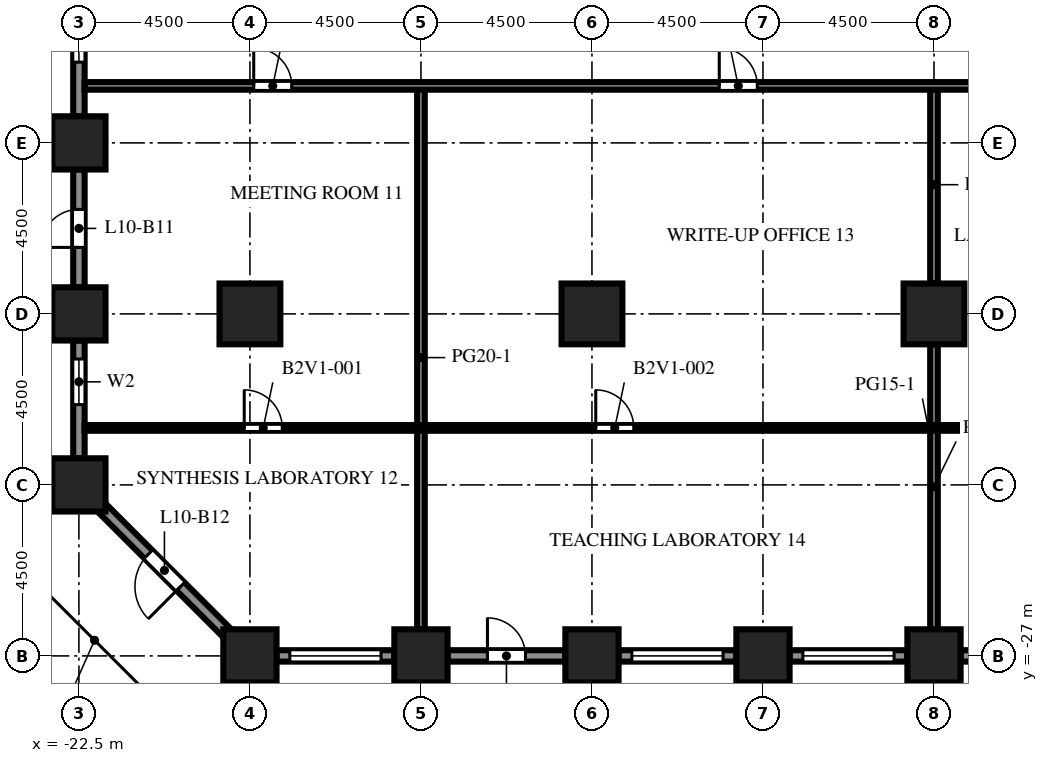
"""IFC4 building model, lengths in metres.
Left out: names, types, materials, properties, quantities, classifications, styles, units other than length and angle.
Written with IfcOpenShell. Run it as: python <this file> out.ifc"""

import sys

from ifc_helpers import new_model, si_unit, direction, frame, frame_2d, origin, origin_2d, place, context, subcontext, project, spatial, rectangle, extrude, element, fill, save


model = new_model("IFC4")
c1 = context("Model", 3, precision=1e-05, world=origin(), true_north=direction((0.0, 1.0)))
c2 = subcontext(c1, "Body", "Model", "MODEL_VIEW")
j1 = project(units=[si_unit("LENGTHUNIT", "METRE"), si_unit("PLANEANGLEUNIT", "RADIAN")], contexts=[c1])
p1 = place(None, origin())
s1 = spatial("IfcSite", under=j1, at=p1, CompositionType="ELEMENT")
p2 = place(p1, origin())
s2 = spatial("IfcBuilding", under=s1, at=p2, CompositionType="ELEMENT")
p3 = place(p2, frame((0.0, 0.0, 46.0)))
s3 = spatial("IfcBuildingStorey", under=s2, at=p3, CompositionType="ELEMENT", Elevation=46.0)
for number, where, z_axis, x_axis in (
    (1, (-22.5, -22.5, 0.0), (0.0, 0.0, 1.0), (1.0, 0.0, 0.0)),
    (2, (-22.5, -18.0, 0.0), (0.0, 0.0, 1.0), (1.0, 0.0, 0.0)),
    (3, (-22.5, -13.5, 0.0), (0.0, 0.0, 1.0), (1.0, 0.0, 0.0)),
    (4, (-18.0, -27.0, 0.0), (0.0, 0.0, 1.0), (1.0, 0.0, 0.0)),
    (5, (-13.5, -27.0, 0.0), (0.0, 0.0, 1.0), (1.0, 0.0, 0.0)),
    (6, (-9.0, -27.0, 0.0), (0.0, 0.0, 1.0), (1.0, 0.0, 0.0)),
    (7, (-4.5, -27.0, 0.0), (0.0, 0.0, 1.0), (1.0, 0.0, 0.0)),
    (8, (0.0, -27.0, 0.0), (0.0, 0.0, 1.0), (1.0, 0.0, 0.0)),
):
    element("IfcColumn", number, at=place(p3, frame(where, z_axis=z_axis, x_axis=x_axis)), inside=s3, PredefinedType="COLUMN", context=c2, shape_type="SweptSolid", body=[
        extrude(rectangle(XDim=1.4, YDim=1.4, at=origin_2d()), origin(), (0.0, 0.0, 1.0), 4.1),
    ])
for number, where, z_axis, x_axis in (
    (9, (-18.0, -18.0, 0.0), (0.0, 0.0, 1.0), (1.0, 0.0, 0.0)),
    (10, (-9.0, -18.0, 0.0), (0.0, 0.0, 1.0), (1.0, 0.0, 0.0)),
    (11, (0.0, -18.0, 0.0), (0.0, 0.0, 1.0), (1.0, 0.0, 0.0)),
):
    element("IfcColumn", number, at=place(p3, frame(where, z_axis=z_axis, x_axis=x_axis)), inside=s3, PredefinedType="COLUMN", context=c2, shape_type="SweptSolid", body=[
        extrude(rectangle(XDim=1.6, YDim=1.6, at=origin_2d()), origin(), (0.0, 0.0, 1.0), 4.1),
    ])
p4 = place(p3, frame((-14.2, -27.0, 0.0), z_axis=(0.0, 0.0, 1.0), x_axis=(-1.0, 0.0, 0.0)))
e12 = element("IfcWall", 12, at=p4, inside=s3, PredefinedType="SOLIDWALL", context=c2, shape_type="SweptSolid", body=[
    extrude(rectangle(XDim=3.1, YDim=0.3, at=frame_2d((1.55, 0.0))), origin(), (0.0, 0.0, 1.0), 2.75),
])
p5 = place(p4, frame((0.35, 0.0, 0.8)))
e13 = element("IfcOpeningElement", 13, at=p5, cuts=e12, PredefinedType="OPENING", context=c2, shape_type="SweptSolid", body=[
    extrude(rectangle(XDim=2.4, YDim=1.7, at=frame_2d((1.2, 0.85))), frame((0.0, 0.16, 0.0), z_axis=(0.0, -1.0, 0.0), x_axis=(1.0, 0.0, 0.0)), (0.0, 0.0, 1.0), 0.32),
])
p6 = place(p3, frame((-9.7, -27.0, 0.0), z_axis=(0.0, 0.0, 1.0), x_axis=(-1.0, 0.0, 0.0)))
e14 = element("IfcWall", 14, at=p6, inside=s3, PredefinedType="SOLIDWALL", context=c2, shape_type="SweptSolid", body=[
    extrude(rectangle(XDim=3.1, YDim=0.3, at=frame_2d((1.55, 0.0))), origin(), (0.0, 0.0, 1.0), 2.75),
])
p7 = place(p6, frame((1.05, 0.0, 0.0)))
e15 = element("IfcOpeningElement", 15, at=p7, cuts=e14, PredefinedType="OPENING", context=c2, shape_type="SweptSolid", body=[
    extrude(rectangle(XDim=1.0, YDim=2.2, at=frame_2d((0.5, 1.1))), frame((0.0, 0.16, 0.0), z_axis=(0.0, -1.0, 0.0), x_axis=(1.0, 0.0, 0.0)), (0.0, 0.0, 1.0), 0.32),
])
p8 = place(p3, frame((-5.2, -27.0, 0.0), z_axis=(0.0, 0.0, 1.0), x_axis=(-1.0, 0.0, 0.0)))
e16 = element("IfcWall", 16, at=p8, inside=s3, PredefinedType="SOLIDWALL", context=c2, shape_type="SweptSolid", body=[
    extrude(rectangle(XDim=3.1, YDim=0.3, at=frame_2d((1.55, 0.0))), origin(), (0.0, 0.0, 1.0), 2.75),
])
p9 = place(p8, frame((0.35, 0.0, 0.8)))
e17 = element("IfcOpeningElement", 17, at=p9, cuts=e16, PredefinedType="OPENING", context=c2, shape_type="SweptSolid", body=[
    extrude(rectangle(XDim=2.4, YDim=1.7, at=frame_2d((1.2, 0.85))), frame((0.0, 0.16, 0.0), z_axis=(0.0, -1.0, 0.0), x_axis=(1.0, 0.0, 0.0)), (0.0, 0.0, 1.0), 0.32),
])
p10 = place(p3, frame((-0.7, -27.0, 0.0), z_axis=(0.0, 0.0, 1.0), x_axis=(-1.0, 0.0, 0.0)))
e18 = element("IfcWall", 18, at=p10, inside=s3, PredefinedType="SOLIDWALL", context=c2, shape_type="SweptSolid", body=[
    extrude(rectangle(XDim=3.1, YDim=0.3, at=frame_2d((1.55, 0.0))), origin(), (0.0, 0.0, 1.0), 2.75),
])
p11 = place(p10, frame((0.35, 0.0, 0.8)))
e19 = element("IfcOpeningElement", 19, at=p11, cuts=e18, PredefinedType="OPENING", context=c2, shape_type="SweptSolid", body=[
    extrude(rectangle(XDim=2.4, YDim=1.7, at=frame_2d((1.2, 0.85))), frame((0.0, 0.16, 0.0), z_axis=(0.0, -1.0, 0.0), x_axis=(1.0, 0.0, 0.0)), (0.0, 0.0, 1.0), 0.32),
])
p12 = place(p3, frame((3.8, -27.0, 0.0), z_axis=(0.0, 0.0, 1.0), x_axis=(-1.0, 0.0, 0.0)))
e20 = element("IfcWall", 20, at=p12, inside=s3, PredefinedType="SOLIDWALL", context=c2, shape_type="SweptSolid", body=[
    extrude(rectangle(XDim=3.1, YDim=0.3, at=frame_2d((1.55, 0.0))), origin(), (0.0, 0.0, 1.0), 2.75),
])
p13 = place(p12, frame((0.35, 0.0, 0.8)))
e21 = element("IfcOpeningElement", 21, at=p13, cuts=e20, PredefinedType="OPENING", context=c2, shape_type="SweptSolid", body=[
    extrude(rectangle(XDim=2.4, YDim=1.7, at=frame_2d((1.2, 0.85))), frame((0.0, 0.16, 0.0), z_axis=(0.0, -1.0, 0.0), x_axis=(1.0, 0.0, 0.0)), (0.0, 0.0, 1.0), 0.32),
])
p14 = place(p3, frame((-22.5, -12.8, 0.0), z_axis=(0.0, 0.0, 1.0), x_axis=(0.0, 1.0, 0.0)))
e22 = element("IfcWall", 22, at=p14, inside=s3, PredefinedType="SOLIDWALL", context=c2, shape_type="SweptSolid", body=[
    extrude(rectangle(XDim=3.1, YDim=0.3, at=frame_2d((1.55, 0.0))), origin(), (0.0, 0.0, 1.0), 2.75),
])
p15 = place(p14, frame((1.425, 0.0, 0.8)))
e23 = element("IfcOpeningElement", 23, at=p15, cuts=e22, PredefinedType="OPENING", context=c2, shape_type="SweptSolid", body=[
    extrude(rectangle(XDim=1.2, YDim=1.7, at=frame_2d((0.6, 0.85))), frame((0.0, 0.16, 0.0), z_axis=(0.0, -1.0, 0.0), x_axis=(1.0, 0.0, 0.0)), (0.0, 0.0, 1.0), 0.32),
])
p16 = place(p3, frame((-22.5, -17.3, 0.0), z_axis=(0.0, 0.0, 1.0), x_axis=(0.0, 1.0, 0.0)))
e24 = element("IfcWall", 24, at=p16, inside=s3, PredefinedType="SOLIDWALL", context=c2, shape_type="SweptSolid", body=[
    extrude(rectangle(XDim=3.1, YDim=0.3, at=frame_2d((1.55, 0.0))), origin(), (0.0, 0.0, 1.0), 2.75),
])
p17 = place(p16, frame((1.05, 0.0, 0.0)))
e25 = element("IfcOpeningElement", 25, at=p17, cuts=e24, PredefinedType="OPENING", context=c2, shape_type="SweptSolid", body=[
    extrude(rectangle(XDim=1.0, YDim=2.2, at=frame_2d((0.5, 1.1))), frame((0.0, 0.16, 0.0), z_axis=(0.0, -1.0, 0.0), x_axis=(1.0, 0.0, 0.0)), (0.0, 0.0, 1.0), 0.32),
])
p18 = place(p3, frame((-22.5, -21.8, 0.0), z_axis=(0.0, 0.0, 1.0), x_axis=(0.0, 1.0, 0.0)))
e26 = element("IfcWall", 26, at=p18, inside=s3, PredefinedType="SOLIDWALL", context=c2, shape_type="SweptSolid", body=[
    extrude(rectangle(XDim=3.1, YDim=0.3, at=frame_2d((1.55, 0.0))), origin(), (0.0, 0.0, 1.0), 2.75),
])
p19 = place(p18, frame((1.413, 0.0, 0.8)))
e27 = element("IfcOpeningElement", 27, at=p19, cuts=e26, PredefinedType="OPENING", context=c2, shape_type="SweptSolid", body=[
    extrude(rectangle(XDim=1.2, YDim=1.7, at=frame_2d((0.6, 0.85))), frame((0.0, 0.16, 0.0), z_axis=(0.0, -1.0, 0.0), x_axis=(1.0, 0.0, 0.0)), (0.0, 0.0, 1.0), 0.32),
])
p20 = place(p3, frame((-18.594, -26.406, 0.0), z_axis=(0.0, 0.0, 1.0), x_axis=(-0.707106781187, 0.707106781187, 0.0)))
e28 = element("IfcWall", 28, at=p20, inside=s3, PredefinedType="SOLIDWALL", context=c2, shape_type="SweptSolid", body=[
    extrude(rectangle(XDim=4.684, YDim=0.3, at=frame_2d((2.342, 0.0))), origin(), (0.0, 0.0, 1.0), 2.75),
])
p21 = place(p20, frame((1.742, 0.0, 0.0)))
e29 = element("IfcOpeningElement", 29, at=p21, cuts=e28, PredefinedType="OPENING", context=c2, shape_type="SweptSolid", body=[
    extrude(rectangle(XDim=1.2, YDim=2.2, at=frame_2d((0.6, 1.1))), frame((0.0, 0.16, 0.0), z_axis=(0.0, -1.0, 0.0), x_axis=(1.0, 0.0, 0.0)), (0.0, 0.0, 1.0), 0.32),
])
p22 = place(p3, frame((-13.5, -26.3, 0.0), z_axis=(0.0, 0.0, 1.0), x_axis=(0.0, 1.0, 0.0)))
e30 = element("IfcWall", 30, at=p22, inside=s3, PredefinedType="PARTITIONING", context=c2, shape_type="SweptSolid", body=[
    extrude(rectangle(XDim=14.3, YDim=0.2, at=frame_2d((7.15, 0.0))), origin(), (0.0, 0.0, 1.0), 3.65),
])
p23 = place(p3, frame((0.0, -26.3, 0.0), z_axis=(0.0, 0.0, 1.0), x_axis=(0.0, 1.0, 0.0)))
e31 = element("IfcWall", 31, at=p23, inside=s3, PredefinedType="PARTITIONING", context=c2, shape_type="SweptSolid", body=[
    extrude(rectangle(XDim=7.5, YDim=0.2, at=frame_2d((3.75, 0.0))), origin(), (0.0, 0.0, 1.0), 3.65),
])
p24 = place(p3, frame((0.0, -17.2, 0.0), z_axis=(0.0, 0.0, 1.0), x_axis=(0.0, 1.0, 0.0)))
e32 = element("IfcWall", 32, at=p24, inside=s3, PredefinedType="PARTITIONING", context=c2, shape_type="SweptSolid", body=[
    extrude(rectangle(XDim=5.2, YDim=0.2, at=frame_2d((2.6, 0.0))), origin(), (0.0, 0.0, 1.0), 3.65),
])
p25 = place(p3, frame((31.35, -21.0, 0.0), z_axis=(0.0, 0.0, 1.0), x_axis=(-1.0, 0.0, 0.0)))
e33 = element("IfcWall", 33, at=p25, inside=s3, PredefinedType="PARTITIONING", context=c2, shape_type="SweptSolid", body=[
    extrude(rectangle(XDim=53.7, YDim=0.15, at=frame_2d((26.85, 0.0))), origin(), (0.0, 0.0, 1.0), 3.65),
])
p26 = place(p25, frame((48.5, 0.0, 0.0)))
e34 = element("IfcOpeningElement", 34, at=p26, cuts=e33, PredefinedType="OPENING", context=c2, shape_type="SweptSolid", body=[
    extrude(rectangle(XDim=1.0, YDim=2.1, at=frame_2d((0.5, 1.05))), frame((0.0, 0.085, 0.0), z_axis=(0.0, -1.0, 0.0), x_axis=(1.0, 0.0, 0.0)), (0.0, 0.0, 1.0), 0.17),
])
p27 = place(p25, frame((39.25, 0.0, 0.0)))
e35 = element("IfcOpeningElement", 35, at=p27, cuts=e33, PredefinedType="OPENING", context=c2, shape_type="SweptSolid", body=[
    extrude(rectangle(XDim=1.0, YDim=2.1, at=frame_2d((0.5, 1.05))), frame((0.0, 0.085, 0.0), z_axis=(0.0, -1.0, 0.0), x_axis=(1.0, 0.0, 0.0)), (0.0, 0.0, 1.0), 0.17),
])
p28 = place(p25, frame((22.75, 0.0, 0.0)))
e36 = element("IfcOpeningElement", 36, at=p28, cuts=e33, PredefinedType="OPENING", context=c2, shape_type="SweptSolid", body=[
    extrude(rectangle(XDim=1.0, YDim=2.1, at=frame_2d((0.5, 1.05))), frame((0.0, 0.085, 0.0), z_axis=(0.0, -1.0, 0.0), x_axis=(1.0, 0.0, 0.0)), (0.0, 0.0, 1.0), 0.17),
])
p29 = place(p25, frame((13.5, 0.0, 0.0)))
e37 = element("IfcOpeningElement", 37, at=p29, cuts=e33, PredefinedType="OPENING", context=c2, shape_type="SweptSolid", body=[
    extrude(rectangle(XDim=1.0, YDim=2.1, at=frame_2d((0.5, 1.05))), frame((0.0, 0.085, 0.0), z_axis=(0.0, -1.0, 0.0), x_axis=(1.0, 0.0, 0.0)), (0.0, 0.0, 1.0), 0.17),
])
p30 = place(p25, frame((3.25, 0.0, 0.0)))
e38 = element("IfcOpeningElement", 38, at=p30, cuts=e33, PredefinedType="OPENING", context=c2, shape_type="SweptSolid", body=[
    extrude(rectangle(XDim=1.0, YDim=2.1, at=frame_2d((0.5, 1.05))), frame((0.0, 0.085, 0.0), z_axis=(0.0, -1.0, 0.0), x_axis=(1.0, 0.0, 0.0)), (0.0, 0.0, 1.0), 0.17),
])
p31 = place(p3, frame((31.35, -12.0, 0.0), z_axis=(0.0, 0.0, 1.0), x_axis=(-1.0, 0.0, 0.0)))
e39 = element("IfcWall", 39, at=p31, inside=s3, PredefinedType="PARTITIONING", context=c2, shape_type="SweptSolid", body=[
    extrude(rectangle(XDim=53.7, YDim=0.2, at=frame_2d((26.85, 0.0))), origin(), (0.0, 0.0, 1.0), 3.65),
])
p32 = place(p31, frame((48.25, 0.0, 0.0)))
e40 = element("IfcOpeningElement", 40, at=p32, cuts=e39, PredefinedType="OPENING", context=c2, shape_type="SweptSolid", body=[
    extrude(rectangle(XDim=1.0, YDim=2.1, at=frame_2d((0.5, 1.05))), frame((0.0, 0.11, 0.0), z_axis=(0.0, -1.0, 0.0), x_axis=(1.0, 0.0, 0.0)), (0.0, 0.0, 1.0), 0.22),
])
p33 = place(p31, frame((36.0, 0.0, 0.0)))
e41 = element("IfcOpeningElement", 41, at=p33, cuts=e39, PredefinedType="OPENING", context=c2, shape_type="SweptSolid", body=[
    extrude(rectangle(XDim=1.0, YDim=2.1, at=frame_2d((0.5, 1.05))), frame((0.0, 0.11, 0.0), z_axis=(0.0, -1.0, 0.0), x_axis=(1.0, 0.0, 0.0)), (0.0, 0.0, 1.0), 0.22),
])
p34 = place(p31, frame((25.75, 0.0, 0.0)))
e42 = element("IfcOpeningElement", 42, at=p34, cuts=e39, PredefinedType="OPENING", context=c2, shape_type="SweptSolid", body=[
    extrude(rectangle(XDim=1.0, YDim=2.1, at=frame_2d((0.5, 1.05))), frame((0.0, 0.11, 0.0), z_axis=(0.0, -1.0, 0.0), x_axis=(1.0, 0.0, 0.0)), (0.0, 0.0, 1.0), 0.22),
])
p35 = place(p31, frame((12.5, 0.0, 0.0)))
e43 = element("IfcOpeningElement", 43, at=p35, cuts=e39, PredefinedType="OPENING", context=c2, shape_type="SweptSolid", body=[
    extrude(rectangle(XDim=1.0, YDim=2.1, at=frame_2d((0.5, 1.05))), frame((0.0, 0.11, 0.0), z_axis=(0.0, -1.0, 0.0), x_axis=(1.0, 0.0, 0.0)), (0.0, 0.0, 1.0), 0.22),
])
p36 = place(p31, frame((3.75, 0.0, 0.0)))
e44 = element("IfcOpeningElement", 44, at=p36, cuts=e39, PredefinedType="OPENING", context=c2, shape_type="SweptSolid", body=[
    extrude(rectangle(XDim=1.0, YDim=2.1, at=frame_2d((0.5, 1.05))), frame((0.0, 0.11, 0.0), z_axis=(0.0, -1.0, 0.0), x_axis=(1.0, 0.0, 0.0)), (0.0, 0.0, 1.0), 0.22),
])
p37 = place(p5, origin())
e45 = element("IfcWindow", 45, at=p37, inside=s3, PartitioningType="SINGLE_PANEL", PredefinedType="WINDOW", context=c2, shape_type="SweptSolid", body=[
    extrude(rectangle(XDim=2.4, YDim=1.7, at=frame_2d((1.2, 0.85))), frame((0.0, 0.03, 0.0), z_axis=(0.0, -1.0, 0.0), x_axis=(1.0, 0.0, 0.0)), (0.0, 0.0, 1.0), 0.06),
])
fill(e13, e45)
p38 = place(p7, origin())
e46 = element("IfcDoor", 46, at=p38, inside=s3, OperationType="SINGLE_SWING_RIGHT", PredefinedType="DOOR", context=c2, shape_type="SweptSolid", body=[
    extrude(rectangle(XDim=1.0, YDim=2.2, at=frame_2d((0.5, 1.1))), frame((0.0, 0.025, 0.0), z_axis=(0.0, -1.0, 0.0), x_axis=(1.0, 0.0, 0.0)), (0.0, 0.0, 1.0), 0.05),
])
fill(e15, e46)
p39 = place(p9, origin())
e47 = element("IfcWindow", 47, at=p39, inside=s3, PartitioningType="SINGLE_PANEL", PredefinedType="WINDOW", context=c2, shape_type="SweptSolid", body=[
    extrude(rectangle(XDim=2.4, YDim=1.7, at=frame_2d((1.2, 0.85))), frame((0.0, 0.03, 0.0), z_axis=(0.0, -1.0, 0.0), x_axis=(1.0, 0.0, 0.0)), (0.0, 0.0, 1.0), 0.06),
])
fill(e17, e47)
p40 = place(p11, origin())
e48 = element("IfcWindow", 48, at=p40, inside=s3, PartitioningType="SINGLE_PANEL", PredefinedType="WINDOW", context=c2, shape_type="SweptSolid", body=[
    extrude(rectangle(XDim=2.4, YDim=1.7, at=frame_2d((1.2, 0.85))), frame((0.0, 0.03, 0.0), z_axis=(0.0, -1.0, 0.0), x_axis=(1.0, 0.0, 0.0)), (0.0, 0.0, 1.0), 0.06),
])
fill(e19, e48)
p41 = place(p15, origin())
e49 = element("IfcWindow", 49, at=p41, inside=s3, PartitioningType="SINGLE_PANEL", PredefinedType="WINDOW", context=c2, shape_type="SweptSolid", body=[
    extrude(rectangle(XDim=1.2, YDim=1.7, at=frame_2d((0.6, 0.85))), frame((0.0, 0.03, 0.0), z_axis=(0.0, -1.0, 0.0), x_axis=(1.0, 0.0, 0.0)), (0.0, 0.0, 1.0), 0.06),
])
fill(e23, e49)
p42 = place(p17, origin())
e50 = element("IfcDoor", 50, at=p42, inside=s3, OperationType="SINGLE_SWING_LEFT", PredefinedType="DOOR", context=c2, shape_type="SweptSolid", body=[
    extrude(rectangle(XDim=1.0, YDim=2.2, at=frame_2d((0.5, 1.1))), frame((0.0, 0.025, 0.0), z_axis=(0.0, -1.0, 0.0), x_axis=(1.0, 0.0, 0.0)), (0.0, 0.0, 1.0), 0.05),
])
fill(e25, e50)
p43 = place(p19, origin())
e51 = element("IfcWindow", 51, at=p43, inside=s3, PartitioningType="SINGLE_PANEL", PredefinedType="WINDOW", context=c2, shape_type="SweptSolid", body=[
    extrude(rectangle(XDim=1.2, YDim=1.7, at=frame_2d((0.6, 0.85))), frame((0.0, 0.03, 0.0), z_axis=(0.0, -1.0, 0.0), x_axis=(1.0, 0.0, 0.0)), (0.0, 0.0, 1.0), 0.06),
])
fill(e27, e51)
p44 = place(p21, origin())
e52 = element("IfcDoor", 52, at=p44, inside=s3, OperationType="SINGLE_SWING_LEFT", PredefinedType="DOOR", context=c2, shape_type="SweptSolid", body=[
    extrude(rectangle(XDim=1.2, YDim=2.2, at=frame_2d((0.6, 1.1))), frame((0.0, 0.025, 0.0), z_axis=(0.0, -1.0, 0.0), x_axis=(1.0, 0.0, 0.0)), (0.0, 0.0, 1.0), 0.05),
])
fill(e29, e52)
p45 = place(p26, origin())
e53 = element("IfcDoor", 53, at=p45, inside=s3, OperationType="SINGLE_SWING_RIGHT", PredefinedType="DOOR", context=c2, shape_type="SweptSolid", body=[
    extrude(rectangle(XDim=1.0, YDim=2.1, at=frame_2d((0.5, 1.05))), frame((0.0, 0.025, 0.0), z_axis=(0.0, -1.0, 0.0), x_axis=(1.0, 0.0, 0.0)), (0.0, 0.0, 1.0), 0.05),
])
fill(e34, e53)
p46 = place(p27, origin())
e54 = element("IfcDoor", 54, at=p46, inside=s3, OperationType="SINGLE_SWING_RIGHT", PredefinedType="DOOR", context=c2, shape_type="SweptSolid", body=[
    extrude(rectangle(XDim=1.0, YDim=2.1, at=frame_2d((0.5, 1.05))), frame((0.0, 0.025, 0.0), z_axis=(0.0, -1.0, 0.0), x_axis=(1.0, 0.0, 0.0)), (0.0, 0.0, 1.0), 0.05),
])
fill(e35, e54)
p47 = place(p32, origin())
e55 = element("IfcDoor", 55, at=p47, inside=s3, OperationType="SINGLE_SWING_RIGHT", PredefinedType="DOOR", context=c2, shape_type="SweptSolid", body=[
    extrude(rectangle(XDim=1.0, YDim=2.1, at=frame_2d((0.5, 1.05))), frame((0.0, 0.025, 0.0), z_axis=(0.0, -1.0, 0.0), x_axis=(1.0, 0.0, 0.0)), (0.0, 0.0, 1.0), 0.05),
])
fill(e40, e55)
p48 = place(p33, origin())
e56 = element("IfcDoor", 56, at=p48, inside=s3, OperationType="SINGLE_SWING_RIGHT", PredefinedType="DOOR", context=c2, shape_type="SweptSolid", body=[
    extrude(rectangle(XDim=1.0, YDim=2.1, at=frame_2d((0.5, 1.05))), frame((0.0, 0.025, 0.0), z_axis=(0.0, -1.0, 0.0), x_axis=(1.0, 0.0, 0.0)), (0.0, 0.0, 1.0), 0.05),
])
fill(e41, e56)
save(model, sys.argv[1])
